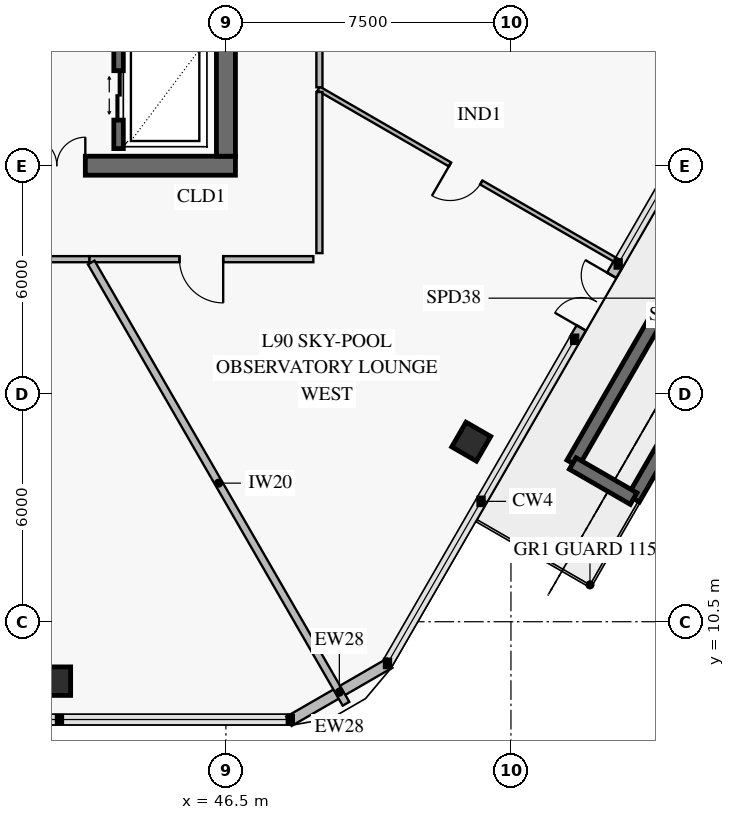
"""IFC4 building model, lengths in metres.
Left out: names, types, materials, properties, quantities, classifications, styles, units other than length and angle.
Written with IfcOpenShell. Run it as: python <this file> out.ifc"""

import sys

from ifc_helpers import new_model, si_unit, direction, frame, frame_2d, origin, origin_2d, place, context, subcontext, project, spatial, rectangle, extrude, element, fill, save


model = new_model("IFC4")
c1 = context("Model", 3, precision=1e-05, world=origin(), true_north=direction((0.0, 1.0)))
c2 = subcontext(c1, "Body", "Model", "MODEL_VIEW")
j1 = project(units=[si_unit("LENGTHUNIT", "METRE"), si_unit("PLANEANGLEUNIT", "RADIAN")], contexts=[c1])
p1 = place(None, origin())
s1 = spatial("IfcSite", under=j1, at=p1, CompositionType="ELEMENT")
p2 = place(p1, origin())
s2 = spatial("IfcBuilding", under=s1, at=p2, CompositionType="ELEMENT")
p3 = place(p2, frame((0.0, 0.0, 353.8)))
s3 = spatial("IfcBuildingStorey", under=s2, at=p3, CompositionType="ELEMENT", Elevation=353.8)
p4 = place(p3, frame((37.35, 22.5, 0.0), z_axis=(0.0, 0.0, 1.0), x_axis=(1.0, 0.0, 0.0)))
e1 = element("IfcWall", 1, at=p4, inside=s3, PredefinedType="SHEAR", context=c2, shape_type="SweptSolid", body=[
    extrude(rectangle(XDim=9.4, YDim=0.5, at=frame_2d((4.7, 0.0))), origin(), (0.0, 0.0, 1.0), 3.8),
])
p5 = place(p4, frame((3.95, 0.0, 0.0)))
e2 = element("IfcOpeningElement", 2, at=p5, cuts=e1, PredefinedType="OPENING", context=c2, shape_type="SweptSolid", body=[
    extrude(rectangle(XDim=1.5, YDim=2.15, at=frame_2d((0.75, 1.075))), frame((0.0, 0.262, 0.0), z_axis=(0.0, -1.0, 0.0), x_axis=(1.0, 0.0, 0.0)), (0.0, 0.0, 1.0), 0.524),
])
p6 = place(p3, frame((46.5, 22.75, 0.0), z_axis=(0.0, 0.0, 1.0), x_axis=(0.0, 1.0, 0.0)))
e3 = element("IfcWall", 3, at=p6, inside=s3, PredefinedType="SHEAR", context=c2, shape_type="SweptSolid", body=[
    extrude(rectangle(XDim=18.5, YDim=0.5, at=frame_2d((9.25, 0.0))), origin(), (0.0, 0.0, 1.0), 3.8),
])
p7 = place(p6, frame((9.0, 0.0, 0.0)))
e4 = element("IfcOpeningElement", 4, at=p7, cuts=e3, PredefinedType="OPENING", context=c2, shape_type="SweptSolid", body=[
    extrude(rectangle(XDim=1.1, YDim=2.15, at=frame_2d((0.55, 1.075))), frame((0.0, 0.262, 0.0), z_axis=(0.0, -1.0, 0.0), x_axis=(1.0, 0.0, 0.0)), (0.0, 0.0, 1.0), 0.524),
])
for number, where, z_axis, x_axis in (
    (5, (55.626, 14.665, 0.0), (0.0, 0.0, 1.0), (0.5, 0.866, 0.0)),
    (6, (62.428, 22.746, 0.0), (0.0, 0.0, 1.0), (-0.5, -0.866, 0.0)),
):
    element("IfcWall", number, at=place(p3, frame(where, z_axis=z_axis, x_axis=x_axis)), inside=s3, PredefinedType="SOLIDWALL", context=c2, shape_type="SweptSolid", body=[
        extrude(rectangle(XDim=10.4, YDim=0.35, at=frame_2d((5.2, 0.0))), origin(), (0.0, 0.0, 1.0), 1.4),
    ])
p8 = place(p3, frame((57.228, 13.74, 0.0), z_axis=(0.0, 0.0, 1.0), x_axis=(-0.866000971088, 0.500042316284, 0.0)))
e7 = element("IfcWall", 7, at=p8, inside=s3, PredefinedType="SOLIDWALL", context=c2, shape_type="SweptSolid", body=[
    extrude(rectangle(XDim=1.85, YDim=0.35, at=frame_2d((0.925, 0.0))), origin(), (0.0, 0.0, 1.0), 1.4),
])
for number, where, z_axis, x_axis in (
    (8, (42.039, 8.936, 0.0), (0.0, 0.0, 1.0), (1.0, 0.0, 0.0)),
    (9, (52.955, 15.238, 0.0), (0.0, 0.0, 1.0), (0.5, 0.866, 0.0)),
):
    element("IfcColumn", number, at=place(p3, frame(where, z_axis=z_axis, x_axis=x_axis)), inside=s3, PredefinedType="COLUMN", context=c2, shape_type="SweptSolid", body=[
        extrude(rectangle(XDim=0.75, YDim=0.75, at=origin_2d()), origin(), (0.0, 0.0, 1.0), 3.35),
    ])
p9 = place(p3, frame((56.821, 19.915, 0.0), z_axis=(0.0, 0.0, 1.0), x_axis=(-0.500014693593, -0.866016920268, 0.0)))
e10 = element("IfcWall", 10, at=p9, inside=s3, PredefinedType="SOLIDWALL", context=c2, shape_type="SweptSolid", body=[
    extrude(rectangle(XDim=2.29, YDim=0.28, at=frame_2d((1.145, 0.0))), origin(), (0.0, 0.0, 1.0), 2.38),
])
p10 = place(p9, frame((0.345, 0.0, 0.0)))
e11 = element("IfcOpeningElement", 11, at=p10, cuts=e10, PredefinedType="OPENING", context=c2, shape_type="SweptSolid", body=[
    extrude(rectangle(XDim=1.6, YDim=2.3, at=frame_2d((0.8, 1.15))), frame((0.0, 0.152, 0.0), z_axis=(0.0, -1.0, 0.0), x_axis=(1.0, 0.0, 0.0)), (0.0, 0.0, 1.0), 0.304),
])
p11 = place(p3, frame((50.811, 9.411, 0.0), z_axis=(0.0, 0.0, 1.0), x_axis=(-0.866023752521, -0.50000286006, 0.0)))
e12 = element("IfcWall", 12, at=p11, inside=s3, PredefinedType="SOLIDWALL", context=c2, shape_type="SweptSolid", body=[
    extrude(rectangle(XDim=3.065, YDim=0.28, at=frame_2d((1.532, 0.0))), origin(), (0.0, 0.0, 1.0), 3.35),
])
p12 = place(p3, frame((43.675, 22.95, 0.0), z_axis=(0.0, 0.0, 1.0), x_axis=(0.0, 1.0, 0.0)))
e13 = element("IfcWall", 13, at=p12, inside=s3, PredefinedType="SOLIDWALL", context=c2, shape_type="SweptSolid", body=[
    extrude(rectangle(XDim=8.2, YDim=0.25, at=frame_2d((4.1, 0.0))), origin(), (0.0, 0.0, 1.0), 3.8),
])
p13 = place(p12, frame((0.75, 0.0, 0.0)))
e14 = element("IfcOpeningElement", 14, at=p13, cuts=e13, PredefinedType="OPENING", context=c2, shape_type="SweptSolid", body=[
    extrude(rectangle(XDim=1.3, YDim=2.3, at=frame_2d((0.65, 1.15))), frame((0.0, 0.137, 0.0), z_axis=(0.0, -1.0, 0.0), x_axis=(1.0, 0.0, 0.0)), (0.0, 0.0, 1.0), 0.274),
])
p14 = place(p12, frame((3.7, 0.0, 0.0)))
e15 = element("IfcOpeningElement", 15, at=p14, cuts=e13, PredefinedType="OPENING", context=c2, shape_type="SweptSolid", body=[
    extrude(rectangle(XDim=1.3, YDim=2.3, at=frame_2d((0.65, 1.15))), frame((0.0, 0.137, 0.0), z_axis=(0.0, -1.0, 0.0), x_axis=(1.0, 0.0, 0.0)), (0.0, 0.0, 1.0), 0.274),
])
p15 = place(p12, frame((6.62, 0.0, 0.0)))
e16 = element("IfcOpeningElement", 16, at=p15, cuts=e13, PredefinedType="OPENING", context=c2, shape_type="SweptSolid", body=[
    extrude(rectangle(XDim=0.9, YDim=2.1, at=frame_2d((0.45, 1.05))), frame((0.0, 0.137, 0.0), z_axis=(0.0, -1.0, 0.0), x_axis=(1.0, 0.0, 0.0)), (0.0, 0.0, 1.0), 0.274),
])
p16 = place(p3, frame((48.94, 24.529, 0.0), z_axis=(0.0, 0.0, 1.0), x_axis=(0.866028436312, -0.499994747472, 0.0)))
e17 = element("IfcWall", 17, at=p16, inside=s3, PredefinedType="PARTITIONING", context=c2, shape_type="SweptSolid", body=[
    extrude(rectangle(XDim=9.132, YDim=0.12, at=frame_2d((4.566, 0.0))), origin(), (0.0, 0.0, 1.0), 2.25),
])
p17 = place(p16, frame((3.991, 0.0, 0.0)))
e18 = element("IfcOpeningElement", 18, at=p17, cuts=e17, PredefinedType="OPENING", context=c2, shape_type="SweptSolid", body=[
    extrude(rectangle(XDim=0.95, YDim=2.1, at=frame_2d((0.475, 1.05))), frame((0.0, 0.072, 0.0), z_axis=(0.0, -1.0, 0.0), x_axis=(1.0, 0.0, 0.0)), (0.0, 0.0, 1.0), 0.144),
])
p18 = place(p3, frame((42.905, 20.04, 0.0), z_axis=(0.0, 0.0, 1.0), x_axis=(1.0, 0.0, 0.0)))
e19 = element("IfcWall", 19, at=p18, inside=s3, PredefinedType="PARTITIONING", context=c2, shape_type="SweptSolid", body=[
    extrude(rectangle(XDim=5.895, YDim=0.16, at=frame_2d((2.948, 0.0))), origin(), (0.0, 0.0, 1.0), 2.8),
])
p19 = place(p18, frame((2.372, 0.0, 0.0)))
e20 = element("IfcOpeningElement", 20, at=p19, cuts=e19, PredefinedType="OPENING", context=c2, shape_type="SweptSolid", body=[
    extrude(rectangle(XDim=1.15, YDim=2.2, at=frame_2d((0.575, 1.1))), frame((0.0, 0.092, 0.0), z_axis=(0.0, -1.0, 0.0), x_axis=(1.0, 0.0, 0.0)), (0.0, 0.0, 1.0), 0.184),
])
p20 = place(p3, frame((48.96, 24.564, 0.0), z_axis=(0.0, 0.0, 1.0), x_axis=(0.0, 1.0, 0.0)))
e21 = element("IfcWall", 21, at=p20, inside=s3, PredefinedType="PARTITIONING", context=c2, shape_type="SweptSolid", body=[
    extrude(rectangle(XDim=7.436, YDim=0.16, at=frame_2d((3.718, 0.0))), origin(), (0.0, 0.0, 1.0), 2.8),
])
p21 = place(p20, frame((3.12, 0.0, 0.0)))
e22 = element("IfcOpeningElement", 22, at=p21, cuts=e21, PredefinedType="OPENING", context=c2, shape_type="SweptSolid", body=[
    extrude(rectangle(XDim=1.15, YDim=2.2, at=frame_2d((0.575, 1.1))), frame((0.0, 0.092, 0.0), z_axis=(0.0, -1.0, 0.0), x_axis=(1.0, 0.0, 0.0)), (0.0, 0.0, 1.0), 0.184),
])
p22 = place(p3, frame((32.114, 20.04, 0.0), z_axis=(0.0, 0.0, 1.0), x_axis=(1.0, 0.0, 0.0)))
e23 = element("IfcWall", 23, at=p22, inside=s3, PredefinedType="PARTITIONING", context=c2, shape_type="SweptSolid", body=[
    extrude(rectangle(XDim=10.791, YDim=0.16, at=frame_2d((5.396, 0.0))), origin(), (0.0, 0.0, 1.0), 2.8),
])
p23 = place(p22, frame((4.821, 0.0, 0.0)))
e24 = element("IfcOpeningElement", 24, at=p23, cuts=e23, PredefinedType="OPENING", context=c2, shape_type="SweptSolid", body=[
    extrude(rectangle(XDim=1.15, YDim=2.2, at=frame_2d((0.575, 1.1))), frame((0.0, 0.092, 0.0), z_axis=(0.0, -1.0, 0.0), x_axis=(1.0, 0.0, 0.0)), (0.0, 0.0, 1.0), 0.184),
])
p24 = place(p3, frame((42.956, 19.952, 0.0), z_axis=(0.0, 0.0, 1.0), x_axis=(0.499999361477, -0.866025772436, 0.0)))
e25 = element("IfcWall", 25, at=p24, inside=s3, PredefinedType="PARTITIONING", context=c2, shape_type="SweptSolid", body=[
    extrude(rectangle(XDim=13.407, YDim=0.2, at=frame_2d((6.703, 0.0))), origin(), (0.0, 0.0, 1.0), 2.77),
])
p25 = place(p3, frame((48.96, 20.2, 0.0), z_axis=(0.0, 0.0, 1.0), x_axis=(0.0, 1.0, 0.0)))
e26 = element("IfcWall", 26, at=p25, inside=s3, PredefinedType="PARTITIONING", context=c2, shape_type="SweptSolid", body=[
    extrude(rectangle(XDim=4.239, YDim=0.16, at=frame_2d((2.12, 0.0))), origin(), (0.0, 0.0, 1.0), 3.35),
])
p26 = place(p10, frame((1.6, 0.0, 0.0), z_axis=(0.0, 0.0, 1.0), x_axis=(-1.0, 0.0, 0.0)))
e27 = element("IfcDoor", 27, at=p26, inside=s3, OperationType="DOUBLE_DOOR_SINGLE_SWING", PredefinedType="DOOR", context=c2, shape_type="SweptSolid", body=[
    extrude(rectangle(XDim=1.6, YDim=2.3, at=frame_2d((0.8, 1.15))), frame((0.0, 0.025, 0.0), z_axis=(0.0, -1.0, 0.0), x_axis=(1.0, 0.0, 0.0)), (0.0, 0.0, 1.0), 0.05),
])
fill(e11, e27)
p27 = place(p5, origin())
e28 = element("IfcDoor", 28, at=p27, inside=s3, OperationType="DOUBLE_DOOR_SINGLE_SWING", PredefinedType="DOOR", context=c2, shape_type="SweptSolid", body=[
    extrude(rectangle(XDim=1.5, YDim=2.15, at=frame_2d((0.75, 1.075))), frame((0.0, 0.025, 0.0), z_axis=(0.0, -1.0, 0.0), x_axis=(1.0, 0.0, 0.0)), (0.0, 0.0, 1.0), 0.05),
])
fill(e2, e28)
p28 = place(p13, origin())
e29 = element("IfcDoor", 29, at=p28, inside=s3, OperationType="DOUBLE_DOOR_SLIDING", PredefinedType="DOOR", context=c2, shape_type="SweptSolid", body=[
    extrude(rectangle(XDim=1.3, YDim=2.3, at=frame_2d((0.65, 1.15))), frame((0.0, 0.025, 0.0), z_axis=(0.0, -1.0, 0.0), x_axis=(1.0, 0.0, 0.0)), (0.0, 0.0, 1.0), 0.05),
])
fill(e14, e29)
p29 = place(p17, frame((0.95, 0.0, 0.0), z_axis=(0.0, 0.0, 1.0), x_axis=(-1.0, 0.0, 0.0)))
e30 = element("IfcDoor", 30, at=p29, inside=s3, OperationType="SINGLE_SWING_RIGHT", PredefinedType="DOOR", context=c2, shape_type="SweptSolid", body=[
    extrude(rectangle(XDim=0.95, YDim=2.1, at=frame_2d((0.475, 1.05))), frame((0.0, 0.025, 0.0), z_axis=(0.0, -1.0, 0.0), x_axis=(1.0, 0.0, 0.0)), (0.0, 0.0, 1.0), 0.05),
])
fill(e18, e30)
p30 = place(p19, frame((1.15, 0.0, 0.0), z_axis=(0.0, 0.0, 1.0), x_axis=(-1.0, 0.0, 0.0)))
e31 = element("IfcDoor", 31, at=p30, inside=s3, OperationType="SINGLE_SWING_LEFT", PredefinedType="DOOR", context=c2, shape_type="SweptSolid", body=[
    extrude(rectangle(XDim=1.15, YDim=2.2, at=frame_2d((0.575, 1.1))), frame((0.0, 0.025, 0.0), z_axis=(0.0, -1.0, 0.0), x_axis=(1.0, 0.0, 0.0)), (0.0, 0.0, 1.0), 0.05),
])
fill(e20, e31)
save(model, sys.argv[1])
